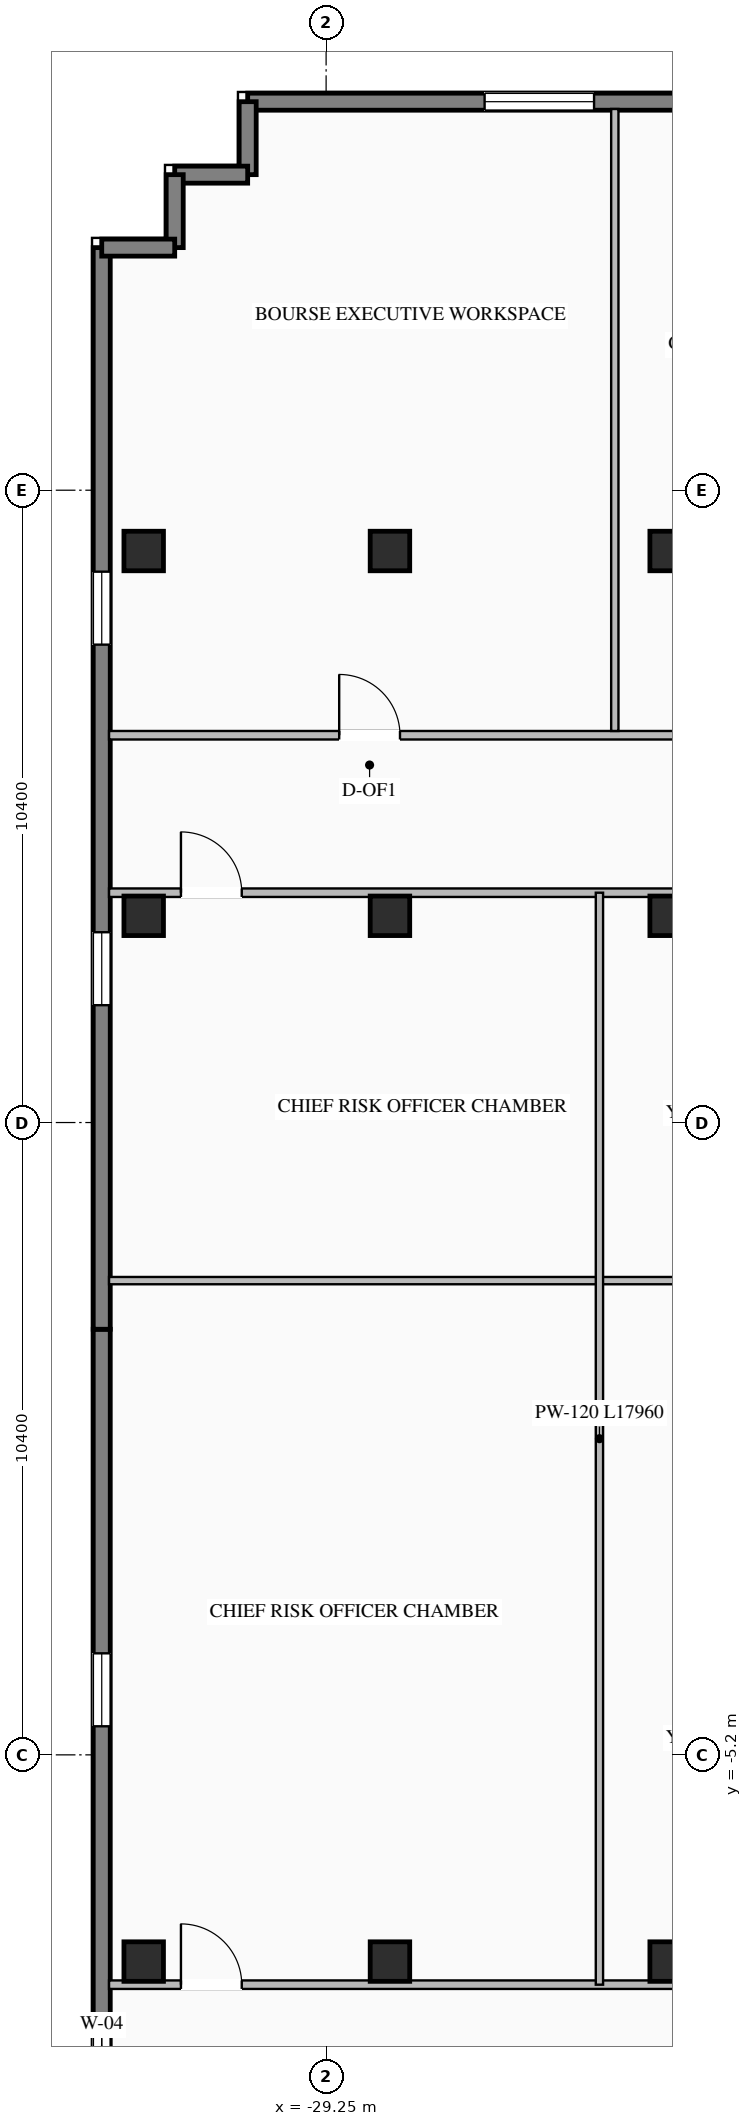
"""IFC4 building model, lengths in metres.
Left out: names, types, materials, properties, quantities, classifications, styles, units other than length and angle.
Written with IfcOpenShell. Run it as: python <this file> out.ifc"""

import sys

from ifc_helpers import new_model, si_unit, direction, frame, frame_2d, origin, origin_2d, place, context, subcontext, project, spatial, rectangle, i_section, extrude, element, fill, save


model = new_model("IFC4")
c1 = context("Model", 3, precision=1e-05, world=origin(), true_north=direction((0.0, 1.0)))
c2 = subcontext(c1, "Body", "Model", "MODEL_VIEW")
j1 = project(units=[si_unit("LENGTHUNIT", "METRE"), si_unit("PLANEANGLEUNIT", "RADIAN")], contexts=[c1])
p1 = place(None, origin())
s1 = spatial("IfcSite", under=j1, at=p1, CompositionType="ELEMENT")
p2 = place(p1, origin())
s2 = spatial("IfcBuilding", under=s1, at=p2, CompositionType="ELEMENT")
p3 = place(p2, frame((0.0, 0.0, 148.45)))
s3 = spatial("IfcBuildingStorey", under=s2, at=p3, CompositionType="ELEMENT", Elevation=148.45)
for number, where, z_axis, x_axis in (
    (1, (-23.6, -8.6, 0.0), (0.0, 0.0, 1.0), (1.0, 0.0, 0.0)),
    (2, (-23.6, 8.6, 0.0), (0.0, 0.0, 1.0), (1.0, 0.0, 0.0)),
    (3, (-23.6, 14.6, 0.0), (0.0, 0.0, 1.0), (1.0, 0.0, 0.0)),
    (4, (-28.2, -8.6, 0.0), (0.0, 0.0, 1.0), (1.0, 0.0, 0.0)),
    (5, (-28.2, 8.6, 0.0), (0.0, 0.0, 1.0), (1.0, 0.0, 0.0)),
    (6, (-28.2, 14.6, 0.0), (0.0, 0.0, 1.0), (1.0, 0.0, 0.0)),
    (7, (-32.25, -8.6, 0.0), (0.0, 0.0, 1.0), (1.0, 0.0, 0.0)),
    (8, (-32.25, 8.6, 0.0), (0.0, 0.0, 1.0), (1.0, 0.0, 0.0)),
    (9, (-32.25, 14.6, 0.0), (0.0, 0.0, 1.0), (1.0, 0.0, 0.0)),
):
    element("IfcColumn", number, at=place(p3, frame(where, z_axis=z_axis, x_axis=x_axis)), inside=s3, PredefinedType="COLUMN", context=c2, shape_type="SweptSolid", body=[
        extrude(i_section(OverallWidth=0.65, OverallDepth=0.65, WebThickness=0.028, FlangeThickness=0.04, at=origin_2d()), origin(), (0.0, 0.0, 1.0), 3.45),
    ])
p4 = place(p3, frame((-30.54, 21.99, 0.0), z_axis=(0.0, 0.0, 1.0), x_axis=(1.0, 0.0, 0.0)))
e10 = element("IfcWall", 10, at=p4, inside=s3, PredefinedType="STANDARD", context=c2, shape_type="SweptSolid", body=[
    extrude(rectangle(XDim=16.04, YDim=0.28, at=frame_2d((8.02, 0.0))), origin(), (0.0, 0.0, 1.0), 3.25),
])
p5 = place(p4, frame((3.897, 0.0, 0.76)))
e11 = element("IfcOpeningElement", 11, at=p5, cuts=e10, PredefinedType="OPENING", context=c2, shape_type="SweptSolid", body=[
    extrude(rectangle(XDim=1.8, YDim=1.95, at=frame_2d((0.9, 0.975))), frame((0.0, 0.15, 0.0), z_axis=(0.0, -1.0, 0.0), x_axis=(1.0, 0.0, 0.0)), (0.0, 0.0, 1.0), 0.3),
])
p6 = place(p4, frame((9.793, 0.0, 0.76)))
e12 = element("IfcOpeningElement", 12, at=p6, cuts=e10, PredefinedType="OPENING", context=c2, shape_type="SweptSolid", body=[
    extrude(rectangle(XDim=1.8, YDim=1.95, at=frame_2d((0.9, 0.975))), frame((0.0, 0.15, 0.0), z_axis=(0.0, -1.0, 0.0), x_axis=(1.0, 0.0, 0.0)), (0.0, 0.0, 1.0), 0.3),
])
p7 = place(p3, frame((-32.94, -15.99, 0.0), z_axis=(0.0, 0.0, 1.0), x_axis=(0.0, 1.0, 0.0)))
e13 = element("IfcWall", 13, at=p7, inside=s3, PredefinedType="STANDARD", context=c2, shape_type="SweptSolid", body=[
    extrude(rectangle(XDim=17.79, YDim=0.28, at=frame_2d((8.895, 0.0))), origin(), (0.0, 0.0, 1.0), 3.25),
])
p8 = place(p7, frame((5.33, 0.0, 0.76)))
e14 = element("IfcOpeningElement", 14, at=p8, cuts=e13, PredefinedType="OPENING", context=c2, shape_type="SweptSolid", body=[
    extrude(rectangle(XDim=1.2, YDim=1.95, at=frame_2d((0.6, 0.975))), frame((0.0, 0.15, 0.0), z_axis=(0.0, -1.0, 0.0), x_axis=(1.0, 0.0, 0.0)), (0.0, 0.0, 1.0), 0.3),
])
p9 = place(p7, frame((11.26, 0.0, 0.76)))
e15 = element("IfcOpeningElement", 15, at=p9, cuts=e13, PredefinedType="OPENING", context=c2, shape_type="SweptSolid", body=[
    extrude(rectangle(XDim=1.2, YDim=1.95, at=frame_2d((0.6, 0.975))), frame((0.0, 0.15, 0.0), z_axis=(0.0, -1.0, 0.0), x_axis=(1.0, 0.0, 0.0)), (0.0, 0.0, 1.0), 0.3),
])
p10 = place(p3, frame((-32.94, 1.8, 0.0), z_axis=(0.0, 0.0, 1.0), x_axis=(0.0, 1.0, 0.0)))
e16 = element("IfcWall", 16, at=p10, inside=s3, PredefinedType="STANDARD", context=c2, shape_type="SweptSolid", body=[
    extrude(rectangle(XDim=17.79, YDim=0.28, at=frame_2d((8.895, 0.0))), origin(), (0.0, 0.0, 1.0), 3.25),
])
p11 = place(p10, frame((5.33, 0.0, 0.76)))
e17 = element("IfcOpeningElement", 17, at=p11, cuts=e16, PredefinedType="OPENING", context=c2, shape_type="SweptSolid", body=[
    extrude(rectangle(XDim=1.2, YDim=1.95, at=frame_2d((0.6, 0.975))), frame((0.0, 0.15, 0.0), z_axis=(0.0, -1.0, 0.0), x_axis=(1.0, 0.0, 0.0)), (0.0, 0.0, 1.0), 0.3),
])
p12 = place(p10, frame((11.26, 0.0, 0.76)))
e18 = element("IfcOpeningElement", 18, at=p12, cuts=e16, PredefinedType="OPENING", context=c2, shape_type="SweptSolid", body=[
    extrude(rectangle(XDim=1.2, YDim=1.95, at=frame_2d((0.6, 0.975))), frame((0.0, 0.15, 0.0), z_axis=(0.0, -1.0, 0.0), x_axis=(1.0, 0.0, 0.0)), (0.0, 0.0, 1.0), 0.3),
])
for number, where, z_axis, x_axis in (
    (19, (-30.54, 21.99, 0.0), (0.0, 0.0, 1.0), (0.0, -1.0, 0.0)),
    (20, (-30.54, 20.79, 0.0), (0.0, 0.0, 1.0), (-1.0, 0.0, 0.0)),
    (21, (-31.74, 20.79, 0.0), (0.0, 0.0, 1.0), (0.0, -1.0, 0.0)),
    (22, (-31.74, 19.59, 0.0), (0.0, 0.0, 1.0), (-1.0, 0.0, 0.0)),
):
    element("IfcWall", number, at=place(p3, frame(where, z_axis=z_axis, x_axis=x_axis)), inside=s3, PredefinedType="STANDARD", context=c2, shape_type="SweptSolid", body=[
        extrude(rectangle(XDim=1.2, YDim=0.28, at=frame_2d((0.6, 0.0))), origin(), (0.0, 0.0, 1.0), 3.25),
    ])
p13 = place(p3, frame((-32.82, 11.57, 0.0), z_axis=(0.0, 0.0, 1.0), x_axis=(1.0, 0.0, 0.0)))
e23 = element("IfcWall", 23, at=p13, inside=s3, PredefinedType="STANDARD", context=c2, shape_type="SweptSolid", body=[
    extrude(rectangle(XDim=63.64, YDim=0.14, at=frame_2d((31.82, 0.0))), origin(), (0.0, 0.0, 1.0), 2.795),
])
p14 = place(p13, frame((3.785, 0.0, 0.0)))
e24 = element("IfcOpeningElement", 24, at=p14, cuts=e23, PredefinedType="OPENING", context=c2, shape_type="SweptSolid", body=[
    extrude(rectangle(XDim=1.0, YDim=2.08, at=frame_2d((0.5, 1.04))), frame((0.0, 0.08, 0.0), z_axis=(0.0, -1.0, 0.0), x_axis=(1.0, 0.0, 0.0)), (0.0, 0.0, 1.0), 0.16),
])
p15 = place(p13, frame((12.264, 0.0, 0.0)))
e25 = element("IfcOpeningElement", 25, at=p15, cuts=e23, PredefinedType="OPENING", context=c2, shape_type="SweptSolid", body=[
    extrude(rectangle(XDim=1.0, YDim=2.08, at=frame_2d((0.5, 1.04))), frame((0.0, 0.08, 0.0), z_axis=(0.0, -1.0, 0.0), x_axis=(1.0, 0.0, 0.0)), (0.0, 0.0, 1.0), 0.16),
])
p16 = place(p13, frame((21.474, 0.0, 0.0)))
e26 = element("IfcOpeningElement", 26, at=p16, cuts=e23, PredefinedType="OPENING", context=c2, shape_type="SweptSolid", body=[
    extrude(rectangle(XDim=1.0, YDim=2.08, at=frame_2d((0.5, 1.04))), frame((0.0, 0.08, 0.0), z_axis=(0.0, -1.0, 0.0), x_axis=(1.0, 0.0, 0.0)), (0.0, 0.0, 1.0), 0.16),
])
p17 = place(p13, frame((31.002, 0.0, 0.0)))
e27 = element("IfcOpeningElement", 27, at=p17, cuts=e23, PredefinedType="OPENING", context=c2, shape_type="SweptSolid", body=[
    extrude(rectangle(XDim=1.0, YDim=2.08, at=frame_2d((0.5, 1.04))), frame((0.0, 0.08, 0.0), z_axis=(0.0, -1.0, 0.0), x_axis=(1.0, 0.0, 0.0)), (0.0, 0.0, 1.0), 0.16),
])
p18 = place(p13, frame((40.53, 0.0, 0.0)))
e28 = element("IfcOpeningElement", 28, at=p18, cuts=e23, PredefinedType="OPENING", context=c2, shape_type="SweptSolid", body=[
    extrude(rectangle(XDim=1.0, YDim=2.08, at=frame_2d((0.5, 1.04))), frame((0.0, 0.08, 0.0), z_axis=(0.0, -1.0, 0.0), x_axis=(1.0, 0.0, 0.0)), (0.0, 0.0, 1.0), 0.16),
])
p19 = place(p13, frame((49.74, 0.0, 0.0)))
e29 = element("IfcOpeningElement", 29, at=p19, cuts=e23, PredefinedType="OPENING", context=c2, shape_type="SweptSolid", body=[
    extrude(rectangle(XDim=1.0, YDim=2.08, at=frame_2d((0.5, 1.04))), frame((0.0, 0.08, 0.0), z_axis=(0.0, -1.0, 0.0), x_axis=(1.0, 0.0, 0.0)), (0.0, 0.0, 1.0), 0.16),
])
p20 = place(p13, frame((58.538, 0.0, 0.0)))
e30 = element("IfcOpeningElement", 30, at=p20, cuts=e23, PredefinedType="OPENING", context=c2, shape_type="SweptSolid", body=[
    extrude(rectangle(XDim=1.0, YDim=2.08, at=frame_2d((0.5, 1.04))), frame((0.0, 0.08, 0.0), z_axis=(0.0, -1.0, 0.0), x_axis=(1.0, 0.0, 0.0)), (0.0, 0.0, 1.0), 0.16),
])
p21 = place(p3, frame((-24.502, 11.64, 0.0), z_axis=(0.0, 0.0, 1.0), x_axis=(0.0, 1.0, 0.0)))
e31 = element("IfcWall", 31, at=p21, inside=s3, PredefinedType="STANDARD", context=c2, shape_type="SweptSolid", body=[
    extrude(rectangle(XDim=10.23, YDim=0.12, at=frame_2d((5.115, 0.0))), origin(), (0.0, 0.0, 1.0), 3.25),
])
p22 = place(p3, frame((-32.82, 8.98, 0.0), z_axis=(0.0, 0.0, 1.0), x_axis=(1.0, 0.0, 0.0)))
e32 = element("IfcWall", 32, at=p22, inside=s3, PredefinedType="STANDARD", context=c2, shape_type="SweptSolid", body=[
    extrude(rectangle(XDim=13.77, YDim=0.14, at=frame_2d((6.885, 0.0))), origin(), (0.0, 0.0, 1.0), 3.25),
])
p23 = place(p22, frame((1.183, 0.0, 0.0)))
e33 = element("IfcOpeningElement", 33, at=p23, cuts=e32, PredefinedType="OPENING", context=c2, shape_type="SweptSolid", body=[
    extrude(rectangle(XDim=1.0, YDim=2.08, at=frame_2d((0.5, 1.04))), frame((0.0, 0.08, 0.0), z_axis=(0.0, -1.0, 0.0), x_axis=(1.0, 0.0, 0.0)), (0.0, 0.0, 1.0), 0.16),
])
p24 = place(p22, frame((10.288, 0.0, 0.0)))
e34 = element("IfcOpeningElement", 34, at=p24, cuts=e32, PredefinedType="OPENING", context=c2, shape_type="SweptSolid", body=[
    extrude(rectangle(XDim=1.0, YDim=2.08, at=frame_2d((0.5, 1.04))), frame((0.0, 0.08, 0.0), z_axis=(0.0, -1.0, 0.0), x_axis=(1.0, 0.0, 0.0)), (0.0, 0.0, 1.0), 0.16),
])
p25 = place(p3, frame((-32.82, -8.98, 0.0), z_axis=(0.0, 0.0, 1.0), x_axis=(1.0, 0.0, 0.0)))
e35 = element("IfcWall", 35, at=p25, inside=s3, PredefinedType="STANDARD", context=c2, shape_type="SweptSolid", body=[
    extrude(rectangle(XDim=13.77, YDim=0.14, at=frame_2d((6.885, 0.0))), origin(), (0.0, 0.0, 1.0), 3.25),
])
p26 = place(p25, frame((1.183, 0.0, 0.0)))
e36 = element("IfcOpeningElement", 36, at=p26, cuts=e35, PredefinedType="OPENING", context=c2, shape_type="SweptSolid", body=[
    extrude(rectangle(XDim=1.0, YDim=2.08, at=frame_2d((0.5, 1.04))), frame((0.0, 0.08, 0.0), z_axis=(0.0, -1.0, 0.0), x_axis=(1.0, 0.0, 0.0)), (0.0, 0.0, 1.0), 0.16),
])
p27 = place(p25, frame((10.288, 0.0, 0.0)))
e37 = element("IfcOpeningElement", 37, at=p27, cuts=e35, PredefinedType="OPENING", context=c2, shape_type="SweptSolid", body=[
    extrude(rectangle(XDim=1.0, YDim=2.08, at=frame_2d((0.5, 1.04))), frame((0.0, 0.08, 0.0), z_axis=(0.0, -1.0, 0.0), x_axis=(1.0, 0.0, 0.0)), (0.0, 0.0, 1.0), 0.16),
])
p28 = place(p3, frame((-32.82, 2.6, 0.0), z_axis=(0.0, 0.0, 1.0), x_axis=(1.0, 0.0, 0.0)))
e38 = element("IfcWall", 38, at=p28, inside=s3, PredefinedType="STANDARD", context=c2, shape_type="SweptSolid", body=[
    extrude(rectangle(XDim=13.77, YDim=0.12, at=frame_2d((6.885, 0.0))), origin(), (0.0, 0.0, 1.0), 3.25),
])
p29 = place(p3, frame((-24.755, -8.98, 0.0), z_axis=(0.0, 0.0, 1.0), x_axis=(0.0, 1.0, 0.0)))
e39 = element("IfcWall", 39, at=p29, inside=s3, PredefinedType="STANDARD", context=c2, shape_type="SweptSolid", body=[
    extrude(rectangle(XDim=17.96, YDim=0.12, at=frame_2d((8.98, 0.0))), origin(), (0.0, 0.0, 1.0), 3.25),
])
p30 = place(p5, origin())
e40 = element("IfcWindow", 40, at=p30, inside=s3, PartitioningType="SINGLE_PANEL", PredefinedType="WINDOW", context=c2, shape_type="SweptSolid", body=[
    extrude(rectangle(XDim=1.8, YDim=1.95, at=frame_2d((0.9, 0.975))), frame((0.0, 0.03, 0.0), z_axis=(0.0, -1.0, 0.0), x_axis=(1.0, 0.0, 0.0)), (0.0, 0.0, 1.0), 0.06),
])
fill(e11, e40)
p31 = place(p8, origin())
e41 = element("IfcWindow", 41, at=p31, inside=s3, PartitioningType="SINGLE_PANEL", PredefinedType="WINDOW", context=c2, shape_type="SweptSolid", body=[
    extrude(rectangle(XDim=1.2, YDim=1.95, at=frame_2d((0.6, 0.975))), frame((0.0, 0.03, 0.0), z_axis=(0.0, -1.0, 0.0), x_axis=(1.0, 0.0, 0.0)), (0.0, 0.0, 1.0), 0.06),
])
fill(e14, e41)
p32 = place(p9, origin())
e42 = element("IfcWindow", 42, at=p32, inside=s3, PartitioningType="SINGLE_PANEL", PredefinedType="WINDOW", context=c2, shape_type="SweptSolid", body=[
    extrude(rectangle(XDim=1.2, YDim=1.95, at=frame_2d((0.6, 0.975))), frame((0.0, 0.03, 0.0), z_axis=(0.0, -1.0, 0.0), x_axis=(1.0, 0.0, 0.0)), (0.0, 0.0, 1.0), 0.06),
])
fill(e15, e42)
p33 = place(p11, origin())
e43 = element("IfcWindow", 43, at=p33, inside=s3, PartitioningType="SINGLE_PANEL", PredefinedType="WINDOW", context=c2, shape_type="SweptSolid", body=[
    extrude(rectangle(XDim=1.2, YDim=1.95, at=frame_2d((0.6, 0.975))), frame((0.0, 0.03, 0.0), z_axis=(0.0, -1.0, 0.0), x_axis=(1.0, 0.0, 0.0)), (0.0, 0.0, 1.0), 0.06),
])
fill(e17, e43)
p34 = place(p12, origin())
e44 = element("IfcWindow", 44, at=p34, inside=s3, PartitioningType="SINGLE_PANEL", PredefinedType="WINDOW", context=c2, shape_type="SweptSolid", body=[
    extrude(rectangle(XDim=1.2, YDim=1.95, at=frame_2d((0.6, 0.975))), frame((0.0, 0.03, 0.0), z_axis=(0.0, -1.0, 0.0), x_axis=(1.0, 0.0, 0.0)), (0.0, 0.0, 1.0), 0.06),
])
fill(e18, e44)
p35 = place(p14, origin())
e45 = element("IfcDoor", 45, at=p35, inside=s3, OperationType="SINGLE_SWING_LEFT", PredefinedType="DOOR", context=c2, shape_type="SweptSolid", body=[
    extrude(rectangle(XDim=1.0, YDim=2.08, at=frame_2d((0.5, 1.04))), frame((0.0, 0.025, 0.0), z_axis=(0.0, -1.0, 0.0), x_axis=(1.0, 0.0, 0.0)), (0.0, 0.0, 1.0), 0.05),
])
fill(e24, e45)
p36 = place(p23, origin())
e46 = element("IfcDoor", 46, at=p36, inside=s3, OperationType="SINGLE_SWING_LEFT", PredefinedType="DOOR", context=c2, shape_type="SweptSolid", body=[
    extrude(rectangle(XDim=1.0, YDim=2.08, at=frame_2d((0.5, 1.04))), frame((0.0, 0.025, 0.0), z_axis=(0.0, -1.0, 0.0), x_axis=(1.0, 0.0, 0.0)), (0.0, 0.0, 1.0), 0.05),
])
fill(e33, e46)
p37 = place(p26, origin())
e47 = element("IfcDoor", 47, at=p37, inside=s3, OperationType="SINGLE_SWING_LEFT", PredefinedType="DOOR", context=c2, shape_type="SweptSolid", body=[
    extrude(rectangle(XDim=1.0, YDim=2.08, at=frame_2d((0.5, 1.04))), frame((0.0, 0.025, 0.0), z_axis=(0.0, -1.0, 0.0), x_axis=(1.0, 0.0, 0.0)), (0.0, 0.0, 1.0), 0.05),
])
fill(e36, e47)
save(model, sys.argv[1])
